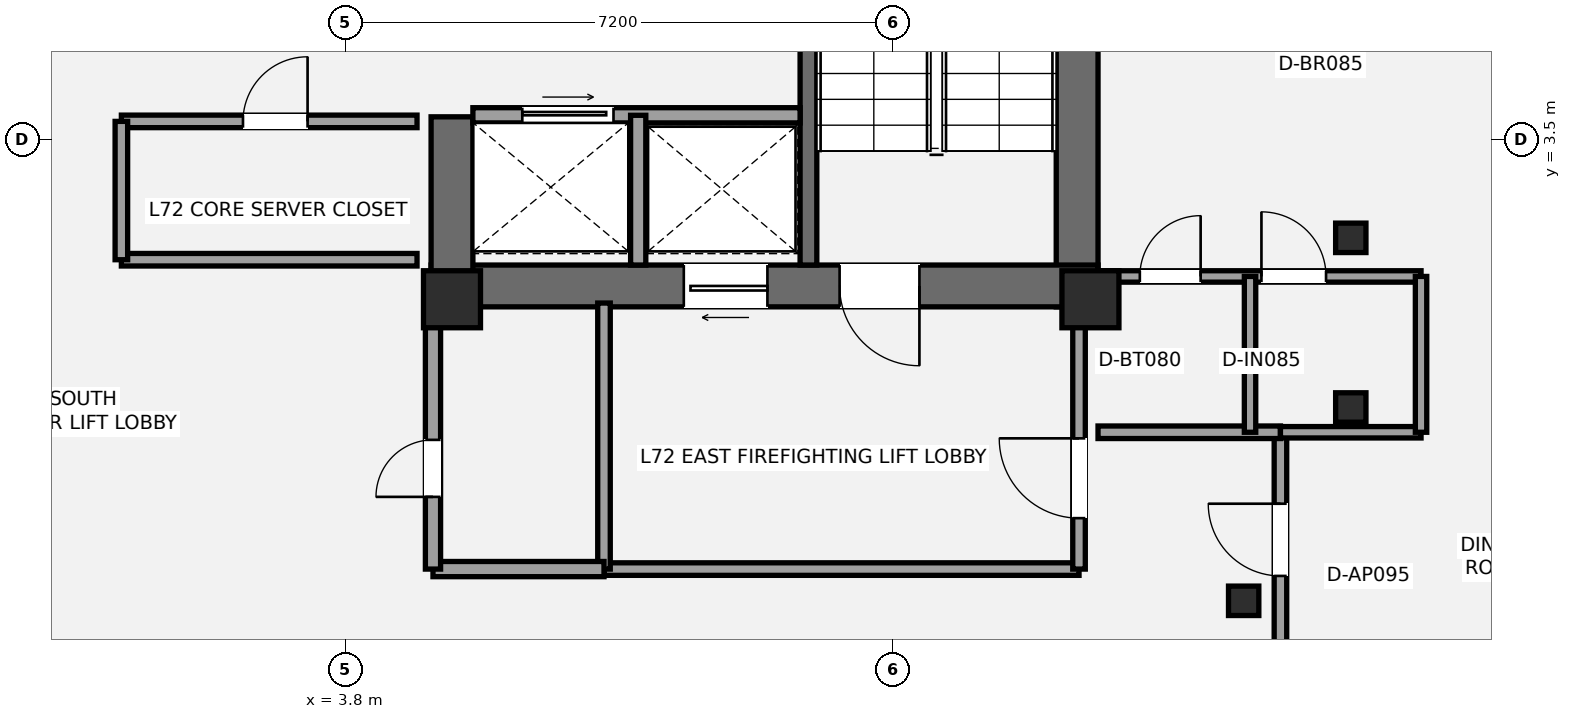
"""IFC4 building model, lengths in metres.
Left out: names, types, materials, properties, quantities, classifications, styles, units other than length and angle.
Written with IfcOpenShell. Run it as: python <this file> out.ifc"""

import sys

from ifc_helpers import new_model, si_unit, direction, frame, frame_2d, origin, origin_2d, place, context, subcontext, project, spatial, rectangle, i_section, extrude, element, fill, save


model = new_model("IFC4")
c1 = context("Model", 3, precision=1e-05, world=origin(), true_north=direction((0.0, 1.0)))
c2 = subcontext(c1, "Body", "Model", "MODEL_VIEW")
j1 = project(units=[si_unit("LENGTHUNIT", "METRE"), si_unit("PLANEANGLEUNIT", "RADIAN")], contexts=[c1])
p1 = place(None, origin())
s1 = spatial("IfcSite", under=j1, at=p1, CompositionType="ELEMENT")
p2 = place(p1, origin())
s2 = spatial("IfcBuilding", under=s1, at=p2, CompositionType="ELEMENT")
p3 = place(p2, frame((0.0, 0.0, 254.1)))
s3 = spatial("IfcBuildingStorey", under=s2, at=p3, CompositionType="ELEMENT", Elevation=254.1)
p4 = place(p3, frame((13.425, 1.3, 0.0), z_axis=(0.0, 0.0, 1.0), x_axis=(0.0, 1.0, 0.0)))
e1 = element("IfcWall", 1, at=p4, inside=s3, PredefinedType="SHEAR", context=c2, shape_type="SweptSolid", body=[
    extrude(rectangle(XDim=8.25, YDim=0.55, at=frame_2d((4.125, 0.0))), origin(), (0.0, 0.0, 1.0), 3.15),
])
p5 = place(p3, frame((13.7, 1.575, 0.0), z_axis=(0.0, 0.0, 1.0), x_axis=(-1.0, 0.0, 0.0)))
e2 = element("IfcWall", 2, at=p5, inside=s3, PredefinedType="SHEAR", context=c2, shape_type="SweptSolid", body=[
    extrude(rectangle(XDim=8.775, YDim=0.55, at=frame_2d((4.387, 0.0))), origin(), (0.0, 0.0, 1.0), 3.15),
])
p6 = place(p5, frame((2.35, 0.0, 0.0)))
e3 = element("IfcOpeningElement", 3, at=p6, cuts=e2, PredefinedType="OPENING", context=c2, shape_type="SweptSolid", body=[
    extrude(rectangle(XDim=1.05, YDim=2.15, at=frame_2d((0.525, 1.075))), frame((0.0, 0.285, 0.0), z_axis=(0.0, -1.0, 0.0), x_axis=(1.0, 0.0, 0.0)), (0.0, 0.0, 1.0), 0.57),
])
p7 = place(p5, frame((4.35, 0.0, 0.0)))
e4 = element("IfcOpeningElement", 4, at=p7, cuts=e2, PredefinedType="OPENING", context=c2, shape_type="SweptSolid", body=[
    extrude(rectangle(XDim=1.1, YDim=2.2, at=frame_2d((0.55, 1.1))), frame((0.0, 0.285, 0.0), z_axis=(0.0, -1.0, 0.0), x_axis=(1.0, 0.0, 0.0)), (0.0, 0.0, 1.0), 0.57),
])
p8 = place(p3, frame((5.2, 1.3, 0.0), z_axis=(0.0, 0.0, 1.0), x_axis=(0.0, 1.0, 0.0)))
e5 = element("IfcWall", 5, at=p8, inside=s3, PredefinedType="SHEAR", context=c2, shape_type="SweptSolid", body=[
    extrude(rectangle(XDim=2.5, YDim=0.55, at=frame_2d((1.25, 0.0))), origin(), (0.0, 0.0, 1.0), 3.15),
])
p9 = place(p3, frame((9.89, 1.85, 0.0), z_axis=(0.0, 0.0, 1.0), x_axis=(0.0, 1.0, 0.0)))
e6 = element("IfcWall", 6, at=p9, inside=s3, PredefinedType="SHEAR", context=c2, shape_type="SweptSolid", body=[
    extrude(rectangle(XDim=7.15, YDim=0.22, at=frame_2d((3.575, 0.0))), origin(), (0.0, 0.0, 1.0), 3.15),
])
for number, where, z_axis, x_axis in (
    (7, (5.2, 1.4, 0.0), (0.0, 0.0, 1.0), (1.0, 0.0, 0.0)),
    (8, (13.6, 1.4, 0.0), (0.0, 0.0, 1.0), (1.0, 0.0, 0.0)),
):
    element("IfcColumn", number, at=place(p3, frame(where, z_axis=z_axis, x_axis=x_axis)), inside=s3, PredefinedType="PILASTER", context=c2, shape_type="SweptSolid", body=[
        extrude(rectangle(XDim=0.75, YDim=0.75, at=origin_2d()), origin(), (0.0, 0.0, 1.0), 3.15),
    ])
for number, where, z_axis, x_axis in (
    (9, (17.026, 2.208, 0.0), (0.0, 0.0, 1.0), (1.0, 0.0, 0.0)),
    (10, (15.616, -2.567, 0.0), (0.0, 0.0, 1.0), (1.0, 0.0, 0.0)),
    (11, (17.026, -0.024, 0.0), (0.0, 0.0, 1.0), (1.0, 0.0, 0.0)),
):
    element("IfcColumn", number, at=place(p3, frame(where, z_axis=z_axis, x_axis=x_axis)), inside=s3, PredefinedType="COLUMN", context=c2, shape_type="SweptSolid", body=[
        extrude(i_section(OverallWidth=0.399, OverallDepth=0.387, WebThickness=0.021, FlangeThickness=0.033, at=origin_2d()), origin(), (0.0, 0.0, 1.0), 3.15),
    ])
p10 = place(p3, frame((7.2, -2.15, 0.0), z_axis=(0.0, 0.0, 1.0), x_axis=(1.0, 0.0, 0.0)))
e12 = element("IfcWall", 12, at=p10, inside=s3, PredefinedType="PARTITIONING", context=c2, shape_type="SweptSolid", body=[
    extrude(rectangle(XDim=6.25, YDim=0.165, at=frame_2d((3.125, 0.0))), origin(), (0.0, 0.0, 1.0), 2.97),
])
p11 = place(p3, frame((7.2, -2.15, 0.0), z_axis=(0.0, 0.0, 1.0), x_axis=(0.0, 1.0, 0.0)))
e13 = element("IfcWall", 13, at=p11, inside=s3, PredefinedType="PARTITIONING", context=c2, shape_type="SweptSolid", body=[
    extrude(rectangle(XDim=3.5, YDim=0.165, at=frame_2d((1.75, 0.0))), origin(), (0.0, 0.0, 1.0), 2.423),
])
p12 = place(p3, frame((13.45, -2.15, 0.0), z_axis=(0.0, 0.0, 1.0), x_axis=(0.0, 1.0, 0.0)))
e14 = element("IfcWall", 14, at=p12, inside=s3, PredefinedType="PARTITIONING", context=c2, shape_type="SweptSolid", body=[
    extrude(rectangle(XDim=3.5, YDim=0.165, at=frame_2d((1.75, 0.0))), origin(), (0.0, 0.0, 1.0), 2.97),
])
p13 = place(p12, frame((0.67, 0.0, 0.0)))
e15 = element("IfcOpeningElement", 15, at=p13, cuts=e14, PredefinedType="OPENING", context=c2, shape_type="SweptSolid", body=[
    extrude(rectangle(XDim=1.05, YDim=2.15, at=frame_2d((0.525, 1.075))), frame((0.0, 0.093, 0.0), z_axis=(0.0, -1.0, 0.0), x_axis=(1.0, 0.0, 0.0)), (0.0, 0.0, 1.0), 0.185),
])
p14 = place(p3, frame((4.95, -2.15, 0.0), z_axis=(0.0, 0.0, 1.0), x_axis=(1.0, 0.0, 0.0)))
e16 = element("IfcWall", 16, at=p14, inside=s3, PredefinedType="SOLIDWALL", context=c2, shape_type="SweptSolid", body=[
    extrude(rectangle(XDim=2.25, YDim=0.2, at=frame_2d((1.125, 0.0))), origin(), (0.0, 0.0, 1.0), 2.97),
])
p15 = place(p3, frame((4.95, -2.15, 0.0), z_axis=(0.0, 0.0, 1.0), x_axis=(0.0, 1.0, 0.0)))
e17 = element("IfcWall", 17, at=p15, inside=s3, PredefinedType="SOLIDWALL", context=c2, shape_type="SweptSolid", body=[
    extrude(rectangle(XDim=3.5, YDim=0.2, at=frame_2d((1.75, 0.0))), origin(), (0.0, 0.0, 1.0), 2.423),
])
p16 = place(p15, frame((0.95, 0.0, 0.0)))
e18 = element("IfcOpeningElement", 18, at=p16, cuts=e17, PredefinedType="OPENING", context=c2, shape_type="SweptSolid", body=[
    extrude(rectangle(XDim=0.75, YDim=2.1, at=frame_2d((0.375, 1.05))), frame((0.0, 0.11, 0.0), z_axis=(0.0, -1.0, 0.0), x_axis=(1.0, 0.0, 0.0)), (0.0, 0.0, 1.0), 0.22),
])
p17 = place(p3, frame((5.475, 3.82, 0.0), z_axis=(0.0, 0.0, 1.0), x_axis=(1.0, 0.0, 0.0)))
e19 = element("IfcWall", 19, at=p17, inside=s3, PredefinedType="SOLIDWALL", context=c2, shape_type="SweptSolid", body=[
    extrude(rectangle(XDim=4.305, YDim=0.2, at=frame_2d((2.152, 0.0))), origin(), (0.0, 0.0, 1.0), 2.97),
])
p18 = place(p17, frame((0.65, 0.0, 0.0)))
e20 = element("IfcOpeningElement", 20, at=p18, cuts=e19, PredefinedType="OPENING", context=c2, shape_type="SweptSolid", body=[
    extrude(rectangle(XDim=1.2, YDim=2.2, at=frame_2d((0.6, 1.1))), frame((0.0, 0.11, 0.0), z_axis=(0.0, -1.0, 0.0), x_axis=(1.0, 0.0, 0.0)), (0.0, 0.0, 1.0), 0.22),
])
p19 = place(p3, frame((7.65, 1.85, 0.0), z_axis=(0.0, 0.0, 1.0), x_axis=(0.0, 1.0, 0.0)))
e21 = element("IfcWall", 21, at=p19, inside=s3, PredefinedType="SOLIDWALL", context=c2, shape_type="SweptSolid", body=[
    extrude(rectangle(XDim=1.97, YDim=0.2, at=frame_2d((0.985, 0.0))), origin(), (0.0, 0.0, 1.0), 2.97),
])
p20 = place(p3, frame((0.85, 1.92, 0.0), z_axis=(0.0, 0.0, 1.0), x_axis=(1.0, 0.0, 0.0)))
e22 = element("IfcWall", 22, at=p20, inside=s3, PredefinedType="PARTITIONING", context=c2, shape_type="SweptSolid", body=[
    extrude(rectangle(XDim=3.89, YDim=0.165, at=frame_2d((1.945, 0.0))), origin(), (0.0, 0.0, 1.0), 2.11),
])
p21 = place(p3, frame((0.85, 3.74, 0.0), z_axis=(0.0, 0.0, 1.0), x_axis=(1.0, 0.0, 0.0)))
e23 = element("IfcWall", 23, at=p21, inside=s3, PredefinedType="PARTITIONING", context=c2, shape_type="SweptSolid", body=[
    extrude(rectangle(XDim=3.89, YDim=0.165, at=frame_2d((1.945, 0.0))), origin(), (0.0, 0.0, 1.0), 2.97),
])
p22 = place(p21, frame((1.6, 0.0, 0.0)))
e24 = element("IfcOpeningElement", 24, at=p22, cuts=e23, PredefinedType="OPENING", context=c2, shape_type="SweptSolid", body=[
    extrude(rectangle(XDim=0.85, YDim=2.1, at=frame_2d((0.425, 1.05))), frame((0.0, 0.093, 0.0), z_axis=(0.0, -1.0, 0.0), x_axis=(1.0, 0.0, 0.0)), (0.0, 0.0, 1.0), 0.185),
])
p23 = place(p3, frame((0.85, 1.92, 0.0), z_axis=(0.0, 0.0, 1.0), x_axis=(0.0, 1.0, 0.0)))
e25 = element("IfcWall", 25, at=p23, inside=s3, PredefinedType="PARTITIONING", context=c2, shape_type="SweptSolid", body=[
    extrude(rectangle(XDim=1.82, YDim=0.165, at=frame_2d((0.91, 0.0))), origin(), (0.0, 0.0, 1.0), 2.97),
])
p24 = place(p3, frame((16.1, -3.95, 0.0), z_axis=(0.0, 0.0, 1.0), x_axis=(0.0, 1.0, 0.0)))
e26 = element("IfcWall", 26, at=p24, inside=s3, PredefinedType="PARTITIONING", context=c2, shape_type="SweptSolid", body=[
    extrude(rectangle(XDim=3.6, YDim=0.165, at=frame_2d((1.8, 0.0))), origin(), (0.0, 0.0, 1.0), 2.357),
])
p25 = place(p24, frame((1.71, 0.0, 0.0)))
e27 = element("IfcOpeningElement", 27, at=p25, cuts=e26, PredefinedType="OPENING", context=c2, shape_type="SweptSolid", body=[
    extrude(rectangle(XDim=0.95, YDim=2.15, at=frame_2d((0.475, 1.075))), frame((0.0, 0.093, 0.0), z_axis=(0.0, -1.0, 0.0), x_axis=(1.0, 0.0, 0.0)), (0.0, 0.0, 1.0), 0.185),
])
p26 = place(p3, frame((13.7, -0.35, 0.0), z_axis=(0.0, 0.0, 1.0), x_axis=(1.0, 0.0, 0.0)))
e28 = element("IfcWall", 28, at=p26, inside=s3, PredefinedType="PARTITIONING", context=c2, shape_type="SweptSolid", body=[
    extrude(rectangle(XDim=2.4, YDim=0.165, at=frame_2d((1.2, 0.0))), origin(), (0.0, 0.0, 1.0), 2.423),
])
p27 = place(p3, frame((13.7, 1.7, 0.0), z_axis=(0.0, 0.0, 1.0), x_axis=(1.0, 0.0, 0.0)))
e29 = element("IfcWall", 29, at=p27, inside=s3, PredefinedType="PLUMBINGWALL", context=c2, shape_type="SweptSolid", body=[
    extrude(rectangle(XDim=4.25, YDim=0.15, at=frame_2d((2.125, 0.0))), origin(), (0.0, 0.0, 1.0), 2.423),
])
p28 = place(p27, frame((0.55, 0.0, 0.0)))
e30 = element("IfcOpeningElement", 30, at=p28, cuts=e29, PredefinedType="OPENING", context=c2, shape_type="SweptSolid", body=[
    extrude(rectangle(XDim=0.8, YDim=2.1, at=frame_2d((0.4, 1.05))), frame((0.0, 0.085, 0.0), z_axis=(0.0, -1.0, 0.0), x_axis=(1.0, 0.0, 0.0)), (0.0, 0.0, 1.0), 0.17),
])
p29 = place(p27, frame((2.15, 0.0, 0.0)))
e31 = element("IfcOpeningElement", 31, at=p29, cuts=e29, PredefinedType="OPENING", context=c2, shape_type="SweptSolid", body=[
    extrude(rectangle(XDim=0.85, YDim=2.1, at=frame_2d((0.425, 1.05))), frame((0.0, 0.085, 0.0), z_axis=(0.0, -1.0, 0.0), x_axis=(1.0, 0.0, 0.0)), (0.0, 0.0, 1.0), 0.17),
])
p30 = place(p3, frame((16.1, -0.35, 0.0), z_axis=(0.0, 0.0, 1.0), x_axis=(1.0, 0.0, 0.0)))
e32 = element("IfcWall", 32, at=p30, inside=s3, PredefinedType="PLUMBINGWALL", context=c2, shape_type="SweptSolid", body=[
    extrude(rectangle(XDim=1.85, YDim=0.15, at=frame_2d((0.925, 0.0))), origin(), (0.0, 0.0, 1.0), 2.423),
])
p31 = place(p3, frame((15.7, -0.35, 0.0), z_axis=(0.0, 0.0, 1.0), x_axis=(0.0, 1.0, 0.0)))
e33 = element("IfcWall", 33, at=p31, inside=s3, PredefinedType="PLUMBINGWALL", context=c2, shape_type="SweptSolid", body=[
    extrude(rectangle(XDim=2.05, YDim=0.15, at=frame_2d((1.025, 0.0))), origin(), (0.0, 0.0, 1.0), 2.423),
])
p32 = place(p3, frame((17.95, -0.35, 0.0), z_axis=(0.0, 0.0, 1.0), x_axis=(0.0, 1.0, 0.0)))
e34 = element("IfcWall", 34, at=p32, inside=s3, PredefinedType="PLUMBINGWALL", context=c2, shape_type="SweptSolid", body=[
    extrude(rectangle(XDim=2.05, YDim=0.15, at=frame_2d((1.025, 0.0))), origin(), (0.0, 0.0, 1.0), 2.97),
])
p33 = place(p6, origin())
e35 = element("IfcDoor", 35, at=p33, inside=s3, OperationType="SINGLE_SWING_LEFT", PredefinedType="DOOR", context=c2, shape_type="SweptSolid", body=[
    extrude(rectangle(XDim=1.05, YDim=2.15, at=frame_2d((0.525, 1.075))), frame((0.0, 0.025, 0.0), z_axis=(0.0, -1.0, 0.0), x_axis=(1.0, 0.0, 0.0)), (0.0, 0.0, 1.0), 0.05),
])
fill(e3, e35)
p34 = place(p13, origin())
e36 = element("IfcDoor", 36, at=p34, inside=s3, OperationType="SINGLE_SWING_RIGHT", PredefinedType="DOOR", context=c2, shape_type="SweptSolid", body=[
    extrude(rectangle(XDim=1.05, YDim=2.15, at=frame_2d((0.525, 1.075))), frame((0.0, 0.025, 0.0), z_axis=(0.0, -1.0, 0.0), x_axis=(1.0, 0.0, 0.0)), (0.0, 0.0, 1.0), 0.05),
])
fill(e15, e36)
p35 = place(p16, origin())
e37 = element("IfcDoor", 37, at=p35, inside=s3, OperationType="SINGLE_SWING_LEFT", PredefinedType="DOOR", context=c2, shape_type="SweptSolid", body=[
    extrude(rectangle(XDim=0.75, YDim=2.1, at=frame_2d((0.375, 1.05))), frame((0.0, 0.025, 0.0), z_axis=(0.0, -1.0, 0.0), x_axis=(1.0, 0.0, 0.0)), (0.0, 0.0, 1.0), 0.05),
])
fill(e18, e37)
p36 = place(p7, origin())
e38 = element("IfcDoor", 38, at=p36, inside=s3, OperationType="SLIDING_TO_LEFT", PredefinedType="DOOR", context=c2, shape_type="SweptSolid", body=[
    extrude(rectangle(XDim=1.1, YDim=2.2, at=frame_2d((0.55, 1.1))), frame((0.0, 0.025, 0.0), z_axis=(0.0, -1.0, 0.0), x_axis=(1.0, 0.0, 0.0)), (0.0, 0.0, 1.0), 0.05),
])
fill(e4, e38)
p37 = place(p18, origin())
e39 = element("IfcDoor", 39, at=p37, inside=s3, OperationType="SLIDING_TO_RIGHT", PredefinedType="DOOR", context=c2, shape_type="SweptSolid", body=[
    extrude(rectangle(XDim=1.2, YDim=2.2, at=frame_2d((0.6, 1.1))), frame((0.0, 0.025, 0.0), z_axis=(0.0, -1.0, 0.0), x_axis=(1.0, 0.0, 0.0)), (0.0, 0.0, 1.0), 0.05),
])
fill(e20, e39)
p38 = place(p22, origin())
e40 = element("IfcDoor", 40, at=p38, inside=s3, OperationType="SINGLE_SWING_RIGHT", PredefinedType="DOOR", context=c2, shape_type="SweptSolid", body=[
    extrude(rectangle(XDim=0.85, YDim=2.1, at=frame_2d((0.425, 1.05))), frame((0.0, 0.025, 0.0), z_axis=(0.0, -1.0, 0.0), x_axis=(1.0, 0.0, 0.0)), (0.0, 0.0, 1.0), 0.05),
])
fill(e24, e40)
p39 = place(p25, origin())
e41 = element("IfcDoor", 41, at=p39, inside=s3, OperationType="SINGLE_SWING_RIGHT", PredefinedType="DOOR", context=c2, shape_type="SweptSolid", body=[
    extrude(rectangle(XDim=0.95, YDim=2.15, at=frame_2d((0.475, 1.075))), frame((0.0, 0.025, 0.0), z_axis=(0.0, -1.0, 0.0), x_axis=(1.0, 0.0, 0.0)), (0.0, 0.0, 1.0), 0.05),
])
fill(e27, e41)
p40 = place(p28, origin())
e42 = element("IfcDoor", 42, at=p40, inside=s3, OperationType="SINGLE_SWING_RIGHT", PredefinedType="DOOR", context=c2, shape_type="SweptSolid", body=[
    extrude(rectangle(XDim=0.8, YDim=2.1, at=frame_2d((0.4, 1.05))), frame((0.0, 0.025, 0.0), z_axis=(0.0, -1.0, 0.0), x_axis=(1.0, 0.0, 0.0)), (0.0, 0.0, 1.0), 0.05),
])
fill(e30, e42)
p41 = place(p29, origin())
e43 = element("IfcDoor", 43, at=p41, inside=s3, OperationType="SINGLE_SWING_LEFT", PredefinedType="DOOR", context=c2, shape_type="SweptSolid", body=[
    extrude(rectangle(XDim=0.85, YDim=2.1, at=frame_2d((0.425, 1.05))), frame((0.0, 0.025, 0.0), z_axis=(0.0, -1.0, 0.0), x_axis=(1.0, 0.0, 0.0)), (0.0, 0.0, 1.0), 0.05),
])
fill(e31, e43)
save(model, sys.argv[1])
